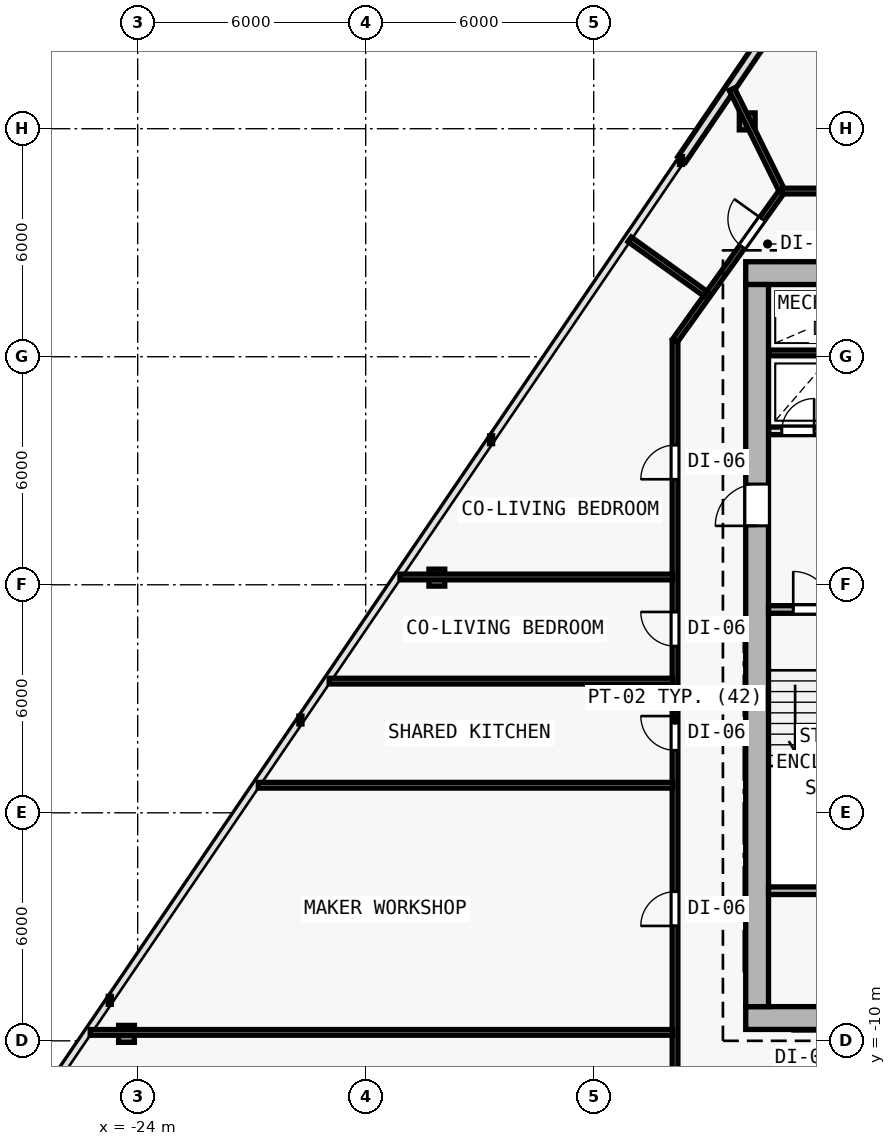
"""IFC4 building model, lengths in metres.
Left out: names, types, materials, properties, quantities, classifications, styles, units other than length and angle.
Written with IfcOpenShell. Run it as: python <this file> out.ifc"""

import sys

from ifc_helpers import new_model, si_unit, direction, frame, frame_2d, origin, origin_2d, place, context, subcontext, project, spatial, rectangle, i_section, extrude, element, fill, save


model = new_model("IFC4")
c1 = context("Model", 3, precision=1e-05, world=origin(), true_north=direction((0.0, 1.0)))
c2 = subcontext(c1, "Body", "Model", "MODEL_VIEW")
j1 = project(units=[si_unit("LENGTHUNIT", "METRE"), si_unit("PLANEANGLEUNIT", "RADIAN")], contexts=[c1])
p1 = place(None, origin())
s1 = spatial("IfcSite", under=j1, at=p1, CompositionType="ELEMENT")
p2 = place(p1, origin())
s2 = spatial("IfcBuilding", under=s1, at=p2, CompositionType="ELEMENT")
p3 = place(p2, frame((0.0, 0.0, 30.0)))
s3 = spatial("IfcBuildingStorey", under=s2, at=p3, CompositionType="ELEMENT", Elevation=30.0)
for number, where, z_axis, x_axis in (
    (1, (-7.7, -9.4, 0.0), (0.0, 0.0, 1.0), (1.0, 0.0, 0.0)),
    (2, (-7.7, 10.2, 0.0), (0.0, 0.0, 1.0), (1.0, 0.0, 0.0)),
    (3, (-7.7, 2.0, 0.0), (0.0, 0.0, 1.0), (1.0, 0.0, 0.0)),
):
    element("IfcColumn", number, at=place(p3, frame(where, z_axis=z_axis, x_axis=x_axis)), inside=s3, PredefinedType="COLUMN", context=c2, shape_type="SweptSolid", body=[
        extrude(i_section(OverallWidth=0.416, OverallDepth=0.446, WebThickness=0.025, FlangeThickness=0.04, FilletRadius=0.015, at=origin_2d()), origin(), (0.0, 0.0, 1.0), 3.6),
    ])
p4 = place(p3, frame((-7.961, 14.192, 0.006), z_axis=(0.008843163607, -0.002516900411, 0.999957730942), x_axis=(0.273743828055, 0.961802639112, 0.0)))
e4 = element("IfcColumn", 4, at=p4, inside=s3, PredefinedType="COLUMN", context=c2, shape_type="SweptSolid", body=[
    extrude(i_section(OverallWidth=0.416, OverallDepth=0.446, WebThickness=0.025, FlangeThickness=0.04, FilletRadius=0.015, at=origin_2d()), origin(), (0.0, 0.0, 1.0), 3.589),
])
p5 = place(p3, frame((-16.127, 2.188, 0.006), z_axis=(0.017003572908, 0.009522000828, 0.999810086971), x_axis=(-0.488603368932, 0.87250601595, 0.0)))
e5 = element("IfcColumn", 5, at=p5, inside=s3, PredefinedType="COLUMN", context=c2, shape_type="SweptSolid", body=[
    extrude(i_section(OverallWidth=0.416, OverallDepth=0.446, WebThickness=0.025, FlangeThickness=0.04, FilletRadius=0.015, at=origin_2d()), origin(), (0.0, 0.0, 1.0), 3.59),
])
p6 = place(p3, frame((-24.294, -9.817, 0.006), z_axis=(0.025224163578, 0.021620711639, 0.999447990843), x_axis=(-0.650791373456, 0.759256602365, 0.0)))
e6 = element("IfcColumn", 6, at=p6, inside=s3, PredefinedType="COLUMN", context=c2, shape_type="SweptSolid", body=[
    extrude(i_section(OverallWidth=0.416, OverallDepth=0.446, WebThickness=0.025, FlangeThickness=0.04, FilletRadius=0.015, at=origin_2d()), origin(), (0.0, 0.0, 1.0), 3.591),
])
p7 = place(p3, frame((-9.684, 13.191, 0.0), z_axis=(0.0, 0.0, 1.0), x_axis=(0.562473549685, 0.826815279192, 0.0)))
e7 = element("IfcWall", 7, at=p7, inside=s3, PredefinedType="SOLIDWALL", context=c2, shape_type="SweptSolid", body=[
    extrude(rectangle(XDim=12.536, YDim=0.25, at=frame_2d((6.268, 0.0))), origin(), (0.0, 0.0, 1.0), 3.35),
])
p8 = place(p7, frame((5.518, 0.0, 0.62)))
e8 = element("IfcOpeningElement", 8, at=p8, cuts=e7, PredefinedType="OPENING", context=c2, shape_type="SweptSolid", body=[
    extrude(rectangle(XDim=1.5, YDim=2.0, at=frame_2d((0.75, 1.0))), frame((0.0, 0.135, 0.0), z_axis=(0.0, -1.0, 0.0), x_axis=(1.0, 0.0, 0.0)), (0.0, 0.0, 1.0), 0.27),
])
p9 = place(p3, frame((-8.0, -9.4, 0.0), z_axis=(0.0, 0.0, 1.0), x_axis=(1.0, 0.0, 0.0)))
e9 = element("IfcWall", 9, at=p9, inside=s3, PredefinedType="SHEAR", context=c2, shape_type="SweptSolid", body=[
    extrude(rectangle(XDim=16.0, YDim=0.6, at=frame_2d((8.0, 0.0))), origin(), (0.0, 0.0, 1.0), 3.35),
])
p10 = place(p9, frame((9.65, 0.0, 0.0)))
e10 = element("IfcOpeningElement", 10, at=p10, cuts=e9, PredefinedType="OPENING", context=c2, shape_type="SweptSolid", body=[
    extrude(rectangle(XDim=1.5, YDim=2.2, at=frame_2d((0.75, 1.1))), frame((0.0, 0.31, 0.0), z_axis=(0.0, -1.0, 0.0), x_axis=(1.0, 0.0, 0.0)), (0.0, 0.0, 1.0), 0.62),
])
p11 = place(p3, frame((8.0, 10.2, 0.0), z_axis=(0.0, 0.0, 1.0), x_axis=(-1.0, 0.0, 0.0)))
e11 = element("IfcWall", 11, at=p11, inside=s3, PredefinedType="SHEAR", context=c2, shape_type="SweptSolid", body=[
    extrude(rectangle(XDim=16.0, YDim=0.6, at=frame_2d((8.0, 0.0))), origin(), (0.0, 0.0, 1.0), 3.35),
])
p12 = place(p11, frame((4.45, 0.0, 0.0)))
e12 = element("IfcOpeningElement", 12, at=p12, cuts=e11, PredefinedType="OPENING", context=c2, shape_type="SweptSolid", body=[
    extrude(rectangle(XDim=1.1, YDim=2.15, at=frame_2d((0.55, 1.075))), frame((0.0, 0.31, 0.0), z_axis=(0.0, -1.0, 0.0), x_axis=(1.0, 0.0, 0.0)), (0.0, 0.0, 1.0), 0.62),
])
p13 = place(p3, frame((-7.7, -9.1, 0.0), z_axis=(0.0, 0.0, 1.0), x_axis=(0.0, 1.0, 0.0)))
e13 = element("IfcWall", 13, at=p13, inside=s3, PredefinedType="SHEAR", context=c2, shape_type="SweptSolid", body=[
    extrude(rectangle(XDim=19.0, YDim=0.6, at=frame_2d((9.5, 0.0))), origin(), (0.0, 0.0, 1.0), 3.35),
])
p14 = place(p13, frame((12.65, 0.0, 0.0)))
e14 = element("IfcOpeningElement", 14, at=p14, cuts=e13, PredefinedType="OPENING", context=c2, shape_type="SweptSolid", body=[
    extrude(rectangle(XDim=1.1, YDim=2.15, at=frame_2d((0.55, 1.075))), frame((0.0, 0.31, 0.0), z_axis=(0.0, -1.0, 0.0), x_axis=(1.0, 0.0, 0.0)), (0.0, 0.0, 1.0), 0.62),
])
p15 = place(p3, frame((-7.4, 1.35, 0.0), z_axis=(0.0, 0.0, 1.0), x_axis=(1.0, 0.0, 0.0)))
e15 = element("IfcWall", 15, at=p15, inside=s3, PredefinedType="SOLIDWALL", context=c2, shape_type="SweptSolid", body=[
    extrude(rectangle(XDim=3.35, YDim=0.2, at=frame_2d((1.675, 0.0))), origin(), (0.0, 0.0, 1.0), 3.35),
])
p16 = place(p15, frame((0.65, 0.0, 0.0)))
e16 = element("IfcOpeningElement", 16, at=p16, cuts=e15, PredefinedType="OPENING", context=c2, shape_type="SweptSolid", body=[
    extrude(rectangle(XDim=1.0, YDim=2.15, at=frame_2d((0.5, 1.075))), frame((0.0, 0.11, 0.0), z_axis=(0.0, -1.0, 0.0), x_axis=(1.0, 0.0, 0.0)), (0.0, 0.0, 1.0), 0.22),
])
p17 = place(p3, frame((-7.395, 6.05, 0.0), z_axis=(0.0, 0.0, 1.0), x_axis=(1.0, 0.0, 0.0)))
e17 = element("IfcWall", 17, at=p17, inside=s3, PredefinedType="SOLIDWALL", context=c2, shape_type="SweptSolid", body=[
    extrude(rectangle(XDim=3.545, YDim=0.2, at=frame_2d((1.772, 0.0))), origin(), (0.0, 0.0, 1.0), 3.35),
])
p18 = place(p17, frame((0.345, 0.0, 0.0)))
e18 = element("IfcOpeningElement", 18, at=p18, cuts=e17, PredefinedType="OPENING", context=c2, shape_type="SweptSolid", body=[
    extrude(rectangle(XDim=0.85, YDim=2.1, at=frame_2d((0.425, 1.05))), frame((0.0, 0.11, 0.0), z_axis=(0.0, -1.0, 0.0), x_axis=(1.0, 0.0, 0.0)), (0.0, 0.0, 1.0), 0.22),
])
p19 = place(p17, frame((2.145, 0.0, 0.0)))
e19 = element("IfcOpeningElement", 19, at=p19, cuts=e17, PredefinedType="OPENING", context=c2, shape_type="SweptSolid", body=[
    extrude(rectangle(XDim=0.85, YDim=2.1, at=frame_2d((0.425, 1.05))), frame((0.0, 0.11, 0.0), z_axis=(0.0, -1.0, 0.0), x_axis=(1.0, 0.0, 0.0)), (0.0, 0.0, 1.0), 0.22),
])
p20 = place(p3, frame((-7.395, 8.1, 0.0), z_axis=(0.0, 0.0, 1.0), x_axis=(1.0, 0.0, 0.0)))
e20 = element("IfcWall", 20, at=p20, inside=s3, PredefinedType="PARTITIONING", context=c2, shape_type="SweptSolid", body=[
    extrude(rectangle(XDim=3.545, YDim=0.15, at=frame_2d((1.772, 0.0))), origin(), (0.0, 0.0, 1.0), 3.35),
])
p21 = place(p3, frame((-7.4, -6.05, 0.0), z_axis=(0.0, 0.0, 1.0), x_axis=(1.0, 0.0, 0.0)))
e21 = element("IfcWall", 21, at=p21, inside=s3, PredefinedType="SOLIDWALL", context=c2, shape_type="SweptSolid", body=[
    extrude(rectangle(XDim=3.35, YDim=0.2, at=frame_2d((1.675, 0.0))), origin(), (0.0, 0.0, 1.0), 3.35),
])
p22 = place(p3, frame((-9.86, -11.56, 0.0), z_axis=(0.0, 0.0, 1.0), x_axis=(0.0, 1.0, 0.0)))
e22 = element("IfcWall", 22, at=p22, inside=s3, PredefinedType="PARTITIONING", context=c2, shape_type="SweptSolid", body=[
    extrude(rectangle(XDim=19.986, YDim=0.15, at=frame_2d((9.993, 0.0))), origin(), (0.0, 0.0, 1.0), 2.609),
])
p23 = place(p22, frame((9.205, 0.0, 0.0)))
e23 = element("IfcOpeningElement", 23, at=p23, cuts=e22, PredefinedType="OPENING", context=c2, shape_type="SweptSolid", body=[
    extrude(rectangle(XDim=0.9, YDim=2.1, at=frame_2d((0.45, 1.05))), frame((0.0, 0.085, 0.0), z_axis=(0.0, -1.0, 0.0), x_axis=(1.0, 0.0, 0.0)), (0.0, 0.0, 1.0), 0.17),
])
p24 = place(p22, frame((4.584, 0.0, 0.0)))
e24 = element("IfcOpeningElement", 24, at=p24, cuts=e22, PredefinedType="OPENING", context=c2, shape_type="SweptSolid", body=[
    extrude(rectangle(XDim=0.9, YDim=2.1, at=frame_2d((0.45, 1.05))), frame((0.0, 0.085, 0.0), z_axis=(0.0, -1.0, 0.0), x_axis=(1.0, 0.0, 0.0)), (0.0, 0.0, 1.0), 0.17),
])
p25 = place(p22, frame((16.336, 0.0, 0.0)))
e25 = element("IfcOpeningElement", 25, at=p25, cuts=e22, PredefinedType="OPENING", context=c2, shape_type="SweptSolid", body=[
    extrude(rectangle(XDim=0.9, YDim=2.1, at=frame_2d((0.45, 1.05))), frame((0.0, 0.085, 0.0), z_axis=(0.0, -1.0, 0.0), x_axis=(1.0, 0.0, 0.0)), (0.0, 0.0, 1.0), 0.17),
])
p26 = place(p22, frame((11.945, 0.0, 0.0)))
e26 = element("IfcOpeningElement", 26, at=p26, cuts=e22, PredefinedType="OPENING", context=c2, shape_type="SweptSolid", body=[
    extrude(rectangle(XDim=0.9, YDim=2.1, at=frame_2d((0.45, 1.05))), frame((0.0, 0.085, 0.0), z_axis=(0.0, -1.0, 0.0), x_axis=(1.0, 0.0, 0.0)), (0.0, 0.0, 1.0), 0.17),
])
p27 = place(p3, frame((-9.86, 8.426, 0.0), z_axis=(0.0, 0.0, 1.0), x_axis=(0.582449511476, 0.812866881218, 0.0)))
e27 = element("IfcWall", 27, at=p27, inside=s3, PredefinedType="PARTITIONING", context=c2, shape_type="SweptSolid", body=[
    extrude(rectangle(XDim=4.84, YDim=0.15, at=frame_2d((2.42, 0.0))), origin(), (0.0, 0.0, 1.0), 2.725),
])
p28 = place(p27, frame((3.035, 0.0, 0.0)))
e28 = element("IfcOpeningElement", 28, at=p28, cuts=e27, PredefinedType="OPENING", context=c2, shape_type="SweptSolid", body=[
    extrude(rectangle(XDim=0.9, YDim=2.1, at=frame_2d((0.45, 1.05))), frame((0.0, 0.085, 0.0), z_axis=(0.0, -1.0, 0.0), x_axis=(1.0, 0.0, 0.0)), (0.0, 0.0, 1.0), 0.17),
])
p29 = place(p3, frame((-7.041, 12.36, 0.0), z_axis=(0.0, 0.0, 1.0), x_axis=(1.0, 0.0, 0.0)))
e29 = element("IfcWall", 29, at=p29, inside=s3, PredefinedType="PARTITIONING", context=c2, shape_type="SweptSolid", body=[
    extrude(rectangle(XDim=14.082, YDim=0.15, at=frame_2d((7.041, 0.0))), origin(), (0.0, 0.0, 1.0), 3.35),
])
p30 = place(p29, frame((10.257, 0.0, 0.0)))
e30 = element("IfcOpeningElement", 30, at=p30, cuts=e29, PredefinedType="OPENING", context=c2, shape_type="SweptSolid", body=[
    extrude(rectangle(XDim=0.9, YDim=2.1, at=frame_2d((0.45, 1.05))), frame((0.0, 0.085, 0.0), z_axis=(0.0, -1.0, 0.0), x_axis=(1.0, 0.0, 0.0)), (0.0, 0.0, 1.0), 0.17),
])
p31 = place(p29, frame((3.394, 0.0, 0.0)))
e31 = element("IfcOpeningElement", 31, at=p31, cuts=e29, PredefinedType="OPENING", context=c2, shape_type="SweptSolid", body=[
    extrude(rectangle(XDim=0.9, YDim=2.1, at=frame_2d((0.45, 1.05))), frame((0.0, 0.085, 0.0), z_axis=(0.0, -1.0, 0.0), x_axis=(1.0, 0.0, 0.0)), (0.0, 0.0, 1.0), 0.17),
])
p32 = place(p3, frame((-7.064, 12.404, 0.0), z_axis=(0.0, 0.0, 1.0), x_axis=(-0.442889132133, 0.896576386393, 0.0)))
e32 = element("IfcWall", 32, at=p32, inside=s3, PredefinedType="PARTITIONING", context=c2, shape_type="SweptSolid", body=[
    extrude(rectangle(XDim=2.939, YDim=0.15, at=frame_2d((1.47, 0.0))), origin(), (0.0, 0.0, 1.0), 2.725),
])
p33 = place(p3, frame((-9.92, 2.205, 0.0), z_axis=(0.0, 0.0, 1.0), x_axis=(-1.0, 0.0, 0.0)))
e33 = element("IfcWall", 33, at=p33, inside=s3, PredefinedType="PARTITIONING", context=c2, shape_type="SweptSolid", body=[
    extrude(rectangle(XDim=7.177, YDim=0.15, at=frame_2d((3.588, 0.0))), origin(), (0.0, 0.0, 1.0), 2.725),
])
p34 = place(p3, frame((-9.92, -9.778, 0.0), z_axis=(0.0, 0.0, 1.0), x_axis=(-1.0, 0.0, 0.0)))
e34 = element("IfcWall", 34, at=p34, inside=s3, PredefinedType="PARTITIONING", context=c2, shape_type="SweptSolid", body=[
    extrude(rectangle(XDim=15.329, YDim=0.15, at=frame_2d((7.664, 0.0))), origin(), (0.0, 0.0, 1.0), 2.609),
])
p35 = place(p3, frame((-9.92, -3.275, 0.0), z_axis=(0.0, 0.0, 1.0), x_axis=(-1.0, 0.0, 0.0)))
e35 = element("IfcWall", 35, at=p35, inside=s3, PredefinedType="PARTITIONING", context=c2, shape_type="SweptSolid", body=[
    extrude(rectangle(XDim=10.905, YDim=0.15, at=frame_2d((5.452, 0.0))), origin(), (0.0, 0.0, 1.0), 2.725),
])
p36 = place(p3, frame((-9.054, 9.654, 0.0), z_axis=(0.0, 0.0, 1.0), x_axis=(-0.81288131697, 0.582429364405, 0.0)))
e36 = element("IfcWall", 36, at=p36, inside=s3, PredefinedType="PARTITIONING", context=c2, shape_type="SweptSolid", body=[
    extrude(rectangle(XDim=2.461, YDim=0.15, at=frame_2d((1.23, 0.0))), origin(), (0.0, 0.0, 1.0), 2.735),
])
p37 = place(p3, frame((-9.92, -0.535, 0.0), z_axis=(0.0, 0.0, 1.0), x_axis=(-1.0, 0.0, 0.0)))
e37 = element("IfcWall", 37, at=p37, inside=s3, PredefinedType="PARTITIONING", context=c2, shape_type="SweptSolid", body=[
    extrude(rectangle(XDim=9.041, YDim=0.15, at=frame_2d((4.521, 0.0))), origin(), (0.0, 0.0, 1.0), 2.725),
])
p38 = place(p14, origin())
e38 = element("IfcDoor", 38, at=p38, inside=s3, OperationType="SINGLE_SWING_LEFT", PredefinedType="DOOR", context=c2, shape_type="SweptSolid", body=[
    extrude(rectangle(XDim=1.1, YDim=2.15, at=frame_2d((0.55, 1.075))), frame((0.0, 0.025, 0.0), z_axis=(0.0, -1.0, 0.0), x_axis=(1.0, 0.0, 0.0)), (0.0, 0.0, 1.0), 0.05),
])
fill(e14, e38)
p39 = place(p16, origin())
e39 = element("IfcDoor", 39, at=p39, inside=s3, OperationType="SINGLE_SWING_LEFT", PredefinedType="DOOR", context=c2, shape_type="SweptSolid", body=[
    extrude(rectangle(XDim=1.0, YDim=2.15, at=frame_2d((0.5, 1.075))), frame((0.0, 0.025, 0.0), z_axis=(0.0, -1.0, 0.0), x_axis=(1.0, 0.0, 0.0)), (0.0, 0.0, 1.0), 0.05),
])
fill(e16, e39)
p40 = place(p18, origin())
e40 = element("IfcDoor", 40, at=p40, inside=s3, OperationType="SINGLE_SWING_RIGHT", PredefinedType="DOOR", context=c2, shape_type="SweptSolid", body=[
    extrude(rectangle(XDim=0.85, YDim=2.1, at=frame_2d((0.425, 1.05))), frame((0.0, 0.025, 0.0), z_axis=(0.0, -1.0, 0.0), x_axis=(1.0, 0.0, 0.0)), (0.0, 0.0, 1.0), 0.05),
])
fill(e18, e40)
p41 = place(p23, origin())
e41 = element("IfcDoor", 41, at=p41, inside=s3, OperationType="SINGLE_SWING_RIGHT", PredefinedType="DOOR", context=c2, shape_type="SweptSolid", body=[
    extrude(rectangle(XDim=0.9, YDim=2.1, at=frame_2d((0.45, 1.05))), frame((0.0, 0.025, 0.0), z_axis=(0.0, -1.0, 0.0), x_axis=(1.0, 0.0, 0.0)), (0.0, 0.0, 1.0), 0.05),
])
fill(e23, e41)
p42 = place(p24, origin())
e42 = element("IfcDoor", 42, at=p42, inside=s3, OperationType="SINGLE_SWING_LEFT", PredefinedType="DOOR", context=c2, shape_type="SweptSolid", body=[
    extrude(rectangle(XDim=0.9, YDim=2.1, at=frame_2d((0.45, 1.05))), frame((0.0, 0.025, 0.0), z_axis=(0.0, -1.0, 0.0), x_axis=(1.0, 0.0, 0.0)), (0.0, 0.0, 1.0), 0.05),
])
fill(e24, e42)
p43 = place(p28, origin())
e43 = element("IfcDoor", 43, at=p43, inside=s3, OperationType="SINGLE_SWING_RIGHT", PredefinedType="DOOR", context=c2, shape_type="SweptSolid", body=[
    extrude(rectangle(XDim=0.9, YDim=2.1, at=frame_2d((0.45, 1.05))), frame((0.0, 0.025, 0.0), z_axis=(0.0, -1.0, 0.0), x_axis=(1.0, 0.0, 0.0)), (0.0, 0.0, 1.0), 0.05),
])
fill(e28, e43)
p44 = place(p25, origin())
e44 = element("IfcDoor", 44, at=p44, inside=s3, OperationType="SINGLE_SWING_LEFT", PredefinedType="DOOR", context=c2, shape_type="SweptSolid", body=[
    extrude(rectangle(XDim=0.9, YDim=2.1, at=frame_2d((0.45, 1.05))), frame((0.0, 0.025, 0.0), z_axis=(0.0, -1.0, 0.0), x_axis=(1.0, 0.0, 0.0)), (0.0, 0.0, 1.0), 0.05),
])
fill(e25, e44)
p45 = place(p26, origin())
e45 = element("IfcDoor", 45, at=p45, inside=s3, OperationType="SINGLE_SWING_RIGHT", PredefinedType="DOOR", context=c2, shape_type="SweptSolid", body=[
    extrude(rectangle(XDim=0.9, YDim=2.1, at=frame_2d((0.45, 1.05))), frame((0.0, 0.025, 0.0), z_axis=(0.0, -1.0, 0.0), x_axis=(1.0, 0.0, 0.0)), (0.0, 0.0, 1.0), 0.05),
])
fill(e26, e45)
save(model, sys.argv[1])
